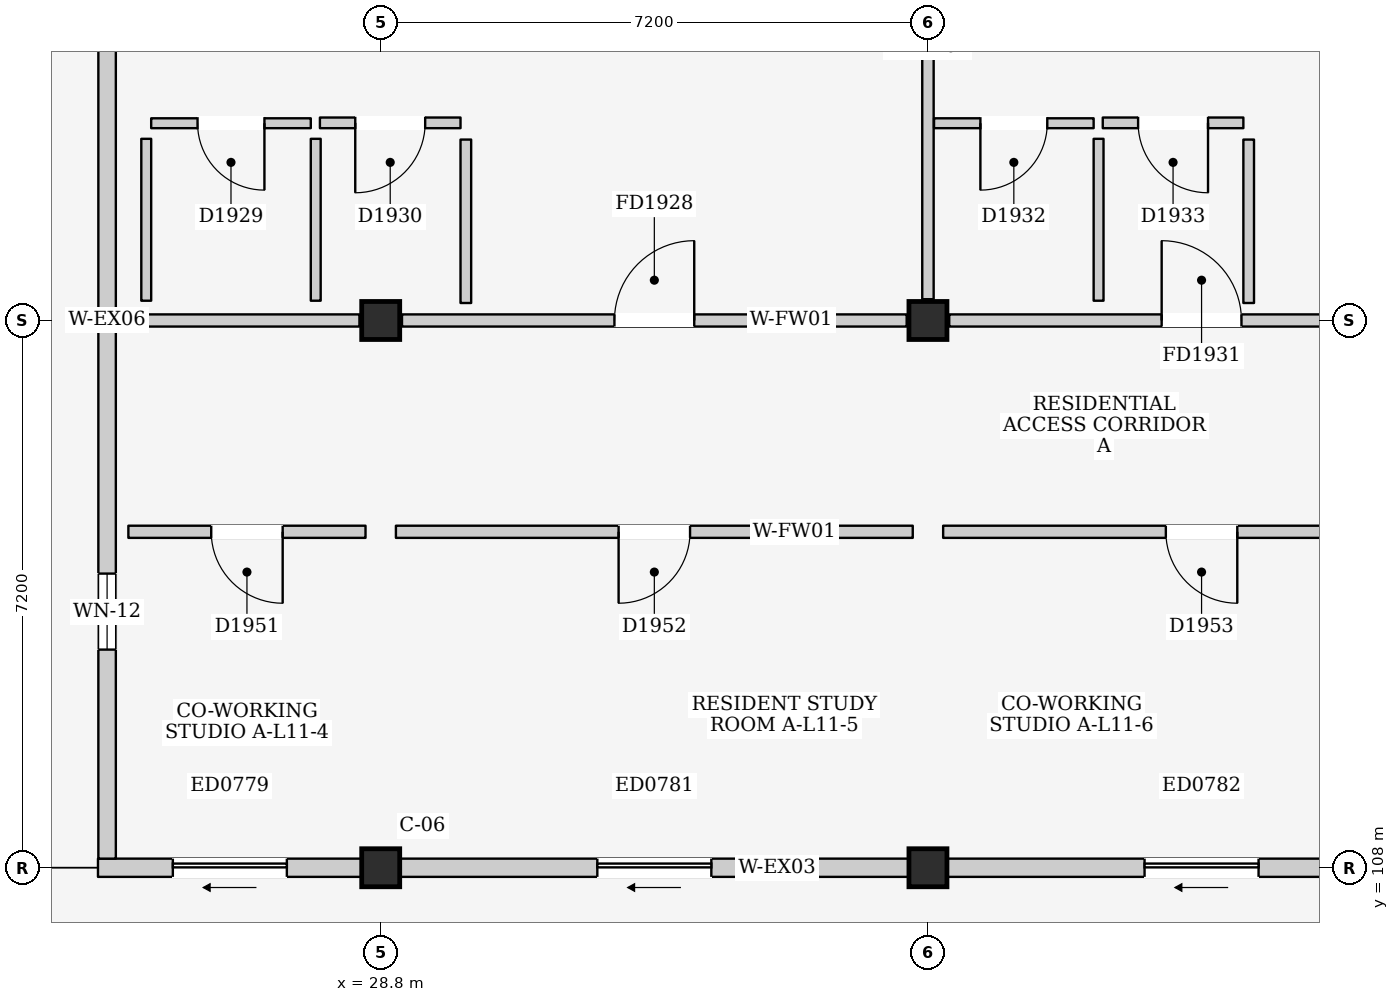
"""IFC4 building model, lengths in metres.
Left out: names, types, materials, properties, quantities, classifications, styles, units other than length and angle.
Written with IfcOpenShell. Run it as: python <this file> out.ifc"""

import sys

from ifc_helpers import new_model, si_unit, direction, frame, frame_2d, origin, origin_2d, place, context, subcontext, project, spatial, rectangle, extrude, element, fill, save


model = new_model("IFC4")
c1 = context("Model", 3, precision=1e-05, world=origin(), true_north=direction((0.0, 1.0)))
c2 = subcontext(c1, "Body", "Model", "MODEL_VIEW")
j1 = project(units=[si_unit("LENGTHUNIT", "METRE"), si_unit("PLANEANGLEUNIT", "RADIAN")], contexts=[c1])
p1 = place(None, origin())
s1 = spatial("IfcSite", under=j1, at=p1, CompositionType="ELEMENT")
p2 = place(p1, origin())
s2 = spatial("IfcBuilding", under=s1, at=p2, CompositionType="ELEMENT")
p3 = place(p2, frame((0.0, 0.0, 38.0)))
s3 = spatial("IfcBuildingStorey", under=s2, at=p3, CompositionType="ELEMENT", Elevation=38.0)
for number, where, z_axis, x_axis in (
    (1, (28.8, 108.0, 0.0), (0.0, 0.0, 1.0), (1.0, 0.0, 0.0)),
    (2, (28.8, 115.2, 0.0), (0.0, 0.0, 1.0), (1.0, 0.0, 0.0)),
    (3, (36.0, 108.0, 0.0), (0.0, 0.0, 1.0), (1.0, 0.0, 0.0)),
    (4, (36.0, 115.2, 0.0), (0.0, 0.0, 1.0), (1.0, 0.0, 0.0)),
):
    element("IfcColumn", number, at=place(p3, frame(where, z_axis=z_axis, x_axis=x_axis)), inside=s3, PredefinedType="COLUMN", context=c2, shape_type="SweptSolid", body=[
        extrude(rectangle(XDim=0.5, YDim=0.5, at=origin_2d()), origin(), (0.0, 0.0, 1.0), 3.2),
    ])
p4 = place(p3, frame((25.08, 108.0, 0.0), z_axis=(0.0, 0.0, 1.0), x_axis=(1.0, 0.0, 0.0)))
e5 = element("IfcWall", 5, at=p4, inside=s3, PredefinedType="ELEMENTEDWALL", context=c2, shape_type="SweptSolid", body=[
    extrude(rectangle(XDim=3.47, YDim=0.24, at=frame_2d((1.735, 0.0))), origin(), (0.0, 0.0, 1.0), 2.325),
])
p5 = place(p4, frame((0.985, 0.0, 0.0)))
e6 = element("IfcOpeningElement", 6, at=p5, cuts=e5, PredefinedType="OPENING", context=c2, shape_type="SweptSolid", body=[
    extrude(rectangle(XDim=1.5, YDim=2.12, at=frame_2d((0.75, 1.06))), frame((0.0, 0.135, 0.0), z_axis=(0.0, -1.0, 0.0), x_axis=(1.0, 0.0, 0.0)), (0.0, 0.0, 1.0), 0.27),
])
p6 = place(p3, frame((29.05, 108.0, 0.0), z_axis=(0.0, 0.0, 1.0), x_axis=(1.0, 0.0, 0.0)))
e7 = element("IfcWall", 7, at=p6, inside=s3, PredefinedType="ELEMENTEDWALL", context=c2, shape_type="SweptSolid", body=[
    extrude(rectangle(XDim=6.7, YDim=0.24, at=frame_2d((3.35, 0.0))), origin(), (0.0, 0.0, 1.0), 2.325),
])
p7 = place(p6, frame((2.6, 0.0, 0.0)))
e8 = element("IfcOpeningElement", 8, at=p7, cuts=e7, PredefinedType="OPENING", context=c2, shape_type="SweptSolid", body=[
    extrude(rectangle(XDim=1.5, YDim=2.12, at=frame_2d((0.75, 1.06))), frame((0.0, 0.135, 0.0), z_axis=(0.0, -1.0, 0.0), x_axis=(1.0, 0.0, 0.0)), (0.0, 0.0, 1.0), 0.27),
])
p8 = place(p3, frame((36.25, 108.0, 0.0), z_axis=(0.0, 0.0, 1.0), x_axis=(1.0, 0.0, 0.0)))
e9 = element("IfcWall", 9, at=p8, inside=s3, PredefinedType="ELEMENTEDWALL", context=c2, shape_type="SweptSolid", body=[
    extrude(rectangle(XDim=6.7, YDim=0.24, at=frame_2d((3.35, 0.0))), origin(), (0.0, 0.0, 1.0), 2.325),
])
p9 = place(p8, frame((2.6, 0.0, 0.0)))
e10 = element("IfcOpeningElement", 10, at=p9, cuts=e9, PredefinedType="OPENING", context=c2, shape_type="SweptSolid", body=[
    extrude(rectangle(XDim=1.5, YDim=2.12, at=frame_2d((0.75, 1.06))), frame((0.0, 0.135, 0.0), z_axis=(0.0, -1.0, 0.0), x_axis=(1.0, 0.0, 0.0)), (0.0, 0.0, 1.0), 0.27),
])
p10 = place(p3, frame((25.2, 108.12, 0.0), z_axis=(0.0, 0.0, 1.0), x_axis=(0.0, 1.0, 0.0)))
e11 = element("IfcWall", 11, at=p10, inside=s3, PredefinedType="ELEMENTEDWALL", context=c2, shape_type="SweptSolid", body=[
    extrude(rectangle(XDim=7.08, YDim=0.23, at=frame_2d((3.54, 0.0))), origin(), (0.0, 0.0, 1.0), 2.425),
])
p11 = place(p10, frame((2.75, 0.0, 1.1)))
e12 = element("IfcOpeningElement", 12, at=p11, cuts=e11, PredefinedType="OPENING", context=c2, shape_type="SweptSolid", body=[
    extrude(rectangle(XDim=1.0, YDim=0.9, at=frame_2d((0.5, 0.45))), frame((0.0, 0.13, 0.0), z_axis=(0.0, -1.0, 0.0), x_axis=(1.0, 0.0, 0.0)), (0.0, 0.0, 1.0), 0.26),
])
p12 = place(p3, frame((25.2, 115.2, 0.0), z_axis=(0.0, 0.0, 1.0), x_axis=(0.0, 1.0, 0.0)))
e13 = element("IfcWall", 13, at=p12, inside=s3, PredefinedType="ELEMENTEDWALL", context=c2, shape_type="SweptSolid", body=[
    extrude(rectangle(XDim=7.08, YDim=0.23, at=frame_2d((3.54, 0.0))), origin(), (0.0, 0.0, 1.0), 2.425),
])
p13 = place(p12, frame((3.6, 0.0, 0.0)))
e14 = element("IfcOpeningElement", 14, at=p13, cuts=e13, PredefinedType="OPENING", context=c2, shape_type="SweptSolid", body=[
    extrude(rectangle(XDim=1.08, YDim=2.12, at=frame_2d((0.54, 1.06))), frame((0.0, 0.13, 0.0), z_axis=(0.0, -1.0, 0.0), x_axis=(1.0, 0.0, 0.0)), (0.0, 0.0, 1.0), 0.26),
])
p14 = place(p3, frame((25.48, 115.2, 0.0), z_axis=(0.0, 0.0, 1.0), x_axis=(1.0, 0.0, 0.0)))
e15 = element("IfcWall", 15, at=p14, inside=s3, PredefinedType="PARTITIONING", context=c2, shape_type="SweptSolid", body=[
    extrude(rectangle(XDim=3.04, YDim=0.16, at=frame_2d((1.52, 0.0))), origin(), (0.0, 0.0, 1.0), 2.325),
])
p15 = place(p3, frame((29.08, 115.2, 0.0), z_axis=(0.0, 0.0, 1.0), x_axis=(1.0, 0.0, 0.0)))
e16 = element("IfcWall", 16, at=p15, inside=s3, PredefinedType="PARTITIONING", context=c2, shape_type="SweptSolid", body=[
    extrude(rectangle(XDim=6.64, YDim=0.16, at=frame_2d((3.32, 0.0))), origin(), (0.0, 0.0, 1.0), 2.325),
])
p16 = place(p15, frame((2.795, 0.0, 0.0)))
e17 = element("IfcOpeningElement", 17, at=p16, cuts=e16, PredefinedType="OPENING", context=c2, shape_type="SweptSolid", body=[
    extrude(rectangle(XDim=1.05, YDim=2.15, at=frame_2d((0.525, 1.075))), frame((0.0, 0.095, 0.0), z_axis=(0.0, -1.0, 0.0), x_axis=(1.0, 0.0, 0.0)), (0.0, 0.0, 1.0), 0.19),
])
p17 = place(p3, frame((36.0, 115.48, 0.0), z_axis=(0.0, 0.0, 1.0), x_axis=(0.0, 1.0, 0.0)))
e18 = element("IfcWall", 18, at=p17, inside=s3, PredefinedType="PARTITIONING", context=c2, shape_type="SweptSolid", body=[
    extrude(rectangle(XDim=6.64, YDim=0.15, at=frame_2d((3.32, 0.0))), origin(), (0.0, 0.0, 1.0), 2.475),
])
p18 = place(p3, frame((25.78, 117.795, 0.0), z_axis=(0.0, 0.0, 1.0), x_axis=(1.0, 0.0, 0.0)))
e19 = element("IfcWall", 19, at=p18, inside=s3, PredefinedType="PARTITIONING", context=c2, shape_type="SweptSolid", body=[
    extrude(rectangle(XDim=2.1, YDim=0.13, at=frame_2d((1.05, 0.0))), origin(), (0.0, 0.0, 1.0), 2.99),
])
p19 = place(p18, frame((0.61, 0.0, 0.0)))
e20 = element("IfcOpeningElement", 20, at=p19, cuts=e19, PredefinedType="OPENING", context=c2, shape_type="SweptSolid", body=[
    extrude(rectangle(XDim=0.88, YDim=2.1, at=frame_2d((0.44, 1.05))), frame((0.0, 0.08, 0.0), z_axis=(0.0, -1.0, 0.0), x_axis=(1.0, 0.0, 0.0)), (0.0, 0.0, 1.0), 0.16),
])
for number, where, z_axis, x_axis in (
    (21, (27.945, 115.46, 0.0), (0.0, 0.0, 1.0), (0.0, 1.0, 0.0)),
    (22, (25.715, 115.46, 0.0), (0.0, 0.0, 1.0), (0.0, 1.0, 0.0)),
):
    element("IfcWall", number, at=place(p3, frame(where, z_axis=z_axis, x_axis=x_axis)), inside=s3, PredefinedType="PARTITIONING", context=c2, shape_type="SweptSolid", body=[
        extrude(rectangle(XDim=2.13, YDim=0.13, at=frame_2d((1.065, 0.0))), origin(), (0.0, 0.0, 1.0), 2.99),
    ])
p20 = place(p3, frame((28.0, 117.8, 0.0), z_axis=(0.0, 0.0, 1.0), x_axis=(1.0, 0.0, 0.0)))
e23 = element("IfcWall", 23, at=p20, inside=s3, PredefinedType="PARTITIONING", context=c2, shape_type="SweptSolid", body=[
    extrude(rectangle(XDim=1.85, YDim=0.14, at=frame_2d((0.925, 0.0))), origin(), (0.0, 0.0, 1.0), 2.99),
])
p21 = place(p20, frame((0.465, 0.0, 0.0)))
e24 = element("IfcOpeningElement", 24, at=p21, cuts=e23, PredefinedType="OPENING", context=c2, shape_type="SweptSolid", body=[
    extrude(rectangle(XDim=0.92, YDim=2.1, at=frame_2d((0.46, 1.05))), frame((0.0, 0.085, 0.0), z_axis=(0.0, -1.0, 0.0), x_axis=(1.0, 0.0, 0.0)), (0.0, 0.0, 1.0), 0.17),
])
p22 = place(p3, frame((29.92, 115.43, 0.0), z_axis=(0.0, 0.0, 1.0), x_axis=(0.0, 1.0, 0.0)))
e25 = element("IfcWall", 25, at=p22, inside=s3, PredefinedType="PARTITIONING", context=c2, shape_type="SweptSolid", body=[
    extrude(rectangle(XDim=2.15, YDim=0.14, at=frame_2d((1.075, 0.0))), origin(), (0.0, 0.0, 1.0), 2.99),
])
p23 = place(p3, frame((36.28, 115.2, 0.0), z_axis=(0.0, 0.0, 1.0), x_axis=(1.0, 0.0, 0.0)))
e26 = element("IfcWall", 26, at=p23, inside=s3, PredefinedType="PARTITIONING", context=c2, shape_type="SweptSolid", body=[
    extrude(rectangle(XDim=6.64, YDim=0.16, at=frame_2d((3.32, 0.0))), origin(), (0.0, 0.0, 1.0), 2.325),
])
p24 = place(p23, frame((2.795, 0.0, 0.0)))
e27 = element("IfcOpeningElement", 27, at=p24, cuts=e26, PredefinedType="OPENING", context=c2, shape_type="SweptSolid", body=[
    extrude(rectangle(XDim=1.05, YDim=2.15, at=frame_2d((0.525, 1.075))), frame((0.0, 0.095, 0.0), z_axis=(0.0, -1.0, 0.0), x_axis=(1.0, 0.0, 0.0)), (0.0, 0.0, 1.0), 0.19),
])
p25 = place(p3, frame((36.08, 117.795, 0.0), z_axis=(0.0, 0.0, 1.0), x_axis=(1.0, 0.0, 0.0)))
e28 = element("IfcWall", 28, at=p25, inside=s3, PredefinedType="PARTITIONING", context=c2, shape_type="SweptSolid", body=[
    extrude(rectangle(XDim=2.1, YDim=0.13, at=frame_2d((1.05, 0.0))), origin(), (0.0, 0.0, 1.0), 2.99),
])
p26 = place(p25, frame((0.61, 0.0, 0.0)))
e29 = element("IfcOpeningElement", 29, at=p26, cuts=e28, PredefinedType="OPENING", context=c2, shape_type="SweptSolid", body=[
    extrude(rectangle(XDim=0.88, YDim=2.1, at=frame_2d((0.44, 1.05))), frame((0.0, 0.08, 0.0), z_axis=(0.0, -1.0, 0.0), x_axis=(1.0, 0.0, 0.0)), (0.0, 0.0, 1.0), 0.16),
])
p27 = place(p3, frame((38.245, 115.46, 0.0), z_axis=(0.0, 0.0, 1.0), x_axis=(0.0, 1.0, 0.0)))
e30 = element("IfcWall", 30, at=p27, inside=s3, PredefinedType="PARTITIONING", context=c2, shape_type="SweptSolid", body=[
    extrude(rectangle(XDim=2.13, YDim=0.13, at=frame_2d((1.065, 0.0))), origin(), (0.0, 0.0, 1.0), 2.99),
])
p28 = place(p3, frame((38.3, 117.8, 0.0), z_axis=(0.0, 0.0, 1.0), x_axis=(1.0, 0.0, 0.0)))
e31 = element("IfcWall", 31, at=p28, inside=s3, PredefinedType="PARTITIONING", context=c2, shape_type="SweptSolid", body=[
    extrude(rectangle(XDim=1.85, YDim=0.14, at=frame_2d((0.925, 0.0))), origin(), (0.0, 0.0, 1.0), 2.99),
])
p29 = place(p28, frame((0.465, 0.0, 0.0)))
e32 = element("IfcOpeningElement", 32, at=p29, cuts=e31, PredefinedType="OPENING", context=c2, shape_type="SweptSolid", body=[
    extrude(rectangle(XDim=0.92, YDim=2.1, at=frame_2d((0.46, 1.05))), frame((0.0, 0.085, 0.0), z_axis=(0.0, -1.0, 0.0), x_axis=(1.0, 0.0, 0.0)), (0.0, 0.0, 1.0), 0.17),
])
p30 = place(p3, frame((40.22, 115.43, 0.0), z_axis=(0.0, 0.0, 1.0), x_axis=(0.0, 1.0, 0.0)))
e33 = element("IfcWall", 33, at=p30, inside=s3, PredefinedType="PARTITIONING", context=c2, shape_type="SweptSolid", body=[
    extrude(rectangle(XDim=2.15, YDim=0.14, at=frame_2d((1.075, 0.0))), origin(), (0.0, 0.0, 1.0), 2.99),
])
p31 = place(p3, frame((25.48, 112.42, 0.0), z_axis=(0.0, 0.0, 1.0), x_axis=(1.0, 0.0, 0.0)))
e34 = element("IfcWall", 34, at=p31, inside=s3, PredefinedType="PARTITIONING", context=c2, shape_type="SweptSolid", body=[
    extrude(rectangle(XDim=3.12, YDim=0.16, at=frame_2d((1.56, 0.0))), origin(), (0.0, 0.0, 1.0), 2.99),
])
p32 = place(p31, frame((1.09, 0.0, 0.0)))
e35 = element("IfcOpeningElement", 35, at=p32, cuts=e34, PredefinedType="OPENING", context=c2, shape_type="SweptSolid", body=[
    extrude(rectangle(XDim=0.94, YDim=2.12, at=frame_2d((0.47, 1.06))), frame((0.0, 0.095, 0.0), z_axis=(0.0, -1.0, 0.0), x_axis=(1.0, 0.0, 0.0)), (0.0, 0.0, 1.0), 0.19),
])
p33 = place(p3, frame((29.0, 112.42, 0.0), z_axis=(0.0, 0.0, 1.0), x_axis=(1.0, 0.0, 0.0)))
e36 = element("IfcWall", 36, at=p33, inside=s3, PredefinedType="PARTITIONING", context=c2, shape_type="SweptSolid", body=[
    extrude(rectangle(XDim=6.8, YDim=0.16, at=frame_2d((3.4, 0.0))), origin(), (0.0, 0.0, 1.0), 2.99),
])
p34 = place(p33, frame((2.93, 0.0, 0.0)))
e37 = element("IfcOpeningElement", 37, at=p34, cuts=e36, PredefinedType="OPENING", context=c2, shape_type="SweptSolid", body=[
    extrude(rectangle(XDim=0.94, YDim=2.12, at=frame_2d((0.47, 1.06))), frame((0.0, 0.095, 0.0), z_axis=(0.0, -1.0, 0.0), x_axis=(1.0, 0.0, 0.0)), (0.0, 0.0, 1.0), 0.19),
])
p35 = place(p3, frame((36.2, 112.42, 0.0), z_axis=(0.0, 0.0, 1.0), x_axis=(1.0, 0.0, 0.0)))
e38 = element("IfcWall", 38, at=p35, inside=s3, PredefinedType="PARTITIONING", context=c2, shape_type="SweptSolid", body=[
    extrude(rectangle(XDim=6.8, YDim=0.16, at=frame_2d((3.4, 0.0))), origin(), (0.0, 0.0, 1.0), 2.99),
])
p36 = place(p35, frame((2.93, 0.0, 0.0)))
e39 = element("IfcOpeningElement", 39, at=p36, cuts=e38, PredefinedType="OPENING", context=c2, shape_type="SweptSolid", body=[
    extrude(rectangle(XDim=0.94, YDim=2.12, at=frame_2d((0.47, 1.06))), frame((0.0, 0.095, 0.0), z_axis=(0.0, -1.0, 0.0), x_axis=(1.0, 0.0, 0.0)), (0.0, 0.0, 1.0), 0.19),
])
p37 = place(p5, frame((1.5, 0.0, 0.0), z_axis=(0.0, 0.0, 1.0), x_axis=(-1.0, 0.0, 0.0)))
e40 = element("IfcDoor", 40, at=p37, inside=s3, OperationType="SLIDING_TO_LEFT", PredefinedType="DOOR", context=c2, shape_type="SweptSolid", body=[
    extrude(rectangle(XDim=1.5, YDim=2.12, at=frame_2d((0.75, 1.06))), frame((0.0, 0.025, 0.0), z_axis=(0.0, -1.0, 0.0), x_axis=(1.0, 0.0, 0.0)), (0.0, 0.0, 1.0), 0.05),
])
fill(e6, e40)
p38 = place(p7, frame((1.5, 0.0, 0.0), z_axis=(0.0, 0.0, 1.0), x_axis=(-1.0, 0.0, 0.0)))
e41 = element("IfcDoor", 41, at=p38, inside=s3, OperationType="SLIDING_TO_LEFT", PredefinedType="DOOR", context=c2, shape_type="SweptSolid", body=[
    extrude(rectangle(XDim=1.5, YDim=2.12, at=frame_2d((0.75, 1.06))), frame((0.0, 0.025, 0.0), z_axis=(0.0, -1.0, 0.0), x_axis=(1.0, 0.0, 0.0)), (0.0, 0.0, 1.0), 0.05),
])
fill(e8, e41)
p39 = place(p9, frame((1.5, 0.0, 0.0), z_axis=(0.0, 0.0, 1.0), x_axis=(-1.0, 0.0, 0.0)))
e42 = element("IfcDoor", 42, at=p39, inside=s3, OperationType="SLIDING_TO_LEFT", PredefinedType="DOOR", context=c2, shape_type="SweptSolid", body=[
    extrude(rectangle(XDim=1.5, YDim=2.12, at=frame_2d((0.75, 1.06))), frame((0.0, 0.025, 0.0), z_axis=(0.0, -1.0, 0.0), x_axis=(1.0, 0.0, 0.0)), (0.0, 0.0, 1.0), 0.05),
])
fill(e10, e42)
p40 = place(p11, origin())
e43 = element("IfcWindow", 43, at=p40, inside=s3, PartitioningType="SINGLE_PANEL", PredefinedType="WINDOW", context=c2, shape_type="SweptSolid", body=[
    extrude(rectangle(XDim=1.0, YDim=0.9, at=frame_2d((0.5, 0.45))), frame((0.0, 0.03, 0.0), z_axis=(0.0, -1.0, 0.0), x_axis=(1.0, 0.0, 0.0)), (0.0, 0.0, 1.0), 0.06),
])
fill(e12, e43)
p41 = place(p16, origin())
e44 = element("IfcDoor", 44, at=p41, inside=s3, OperationType="SINGLE_SWING_RIGHT", PredefinedType="DOOR", context=c2, shape_type="SweptSolid", body=[
    extrude(rectangle(XDim=1.05, YDim=2.15, at=frame_2d((0.525, 1.075))), frame((0.0, 0.025, 0.0), z_axis=(0.0, -1.0, 0.0), x_axis=(1.0, 0.0, 0.0)), (0.0, 0.0, 1.0), 0.05),
])
fill(e17, e44)
p42 = place(p19, frame((0.88, 0.0, 0.0), z_axis=(0.0, 0.0, 1.0), x_axis=(-1.0, 0.0, 0.0)))
e45 = element("IfcDoor", 45, at=p42, inside=s3, OperationType="SINGLE_SWING_LEFT", PredefinedType="DOOR", context=c2, shape_type="SweptSolid", body=[
    extrude(rectangle(XDim=0.88, YDim=2.1, at=frame_2d((0.44, 1.05))), frame((0.0, 0.025, 0.0), z_axis=(0.0, -1.0, 0.0), x_axis=(1.0, 0.0, 0.0)), (0.0, 0.0, 1.0), 0.05),
])
fill(e20, e45)
p43 = place(p21, frame((0.92, 0.0, 0.0), z_axis=(0.0, 0.0, 1.0), x_axis=(-1.0, 0.0, 0.0)))
e46 = element("IfcDoor", 46, at=p43, inside=s3, OperationType="SINGLE_SWING_RIGHT", PredefinedType="DOOR", context=c2, shape_type="SweptSolid", body=[
    extrude(rectangle(XDim=0.92, YDim=2.1, at=frame_2d((0.46, 1.05))), frame((0.0, 0.025, 0.0), z_axis=(0.0, -1.0, 0.0), x_axis=(1.0, 0.0, 0.0)), (0.0, 0.0, 1.0), 0.05),
])
fill(e24, e46)
p44 = place(p24, origin())
e47 = element("IfcDoor", 47, at=p44, inside=s3, OperationType="SINGLE_SWING_LEFT", PredefinedType="DOOR", context=c2, shape_type="SweptSolid", body=[
    extrude(rectangle(XDim=1.05, YDim=2.15, at=frame_2d((0.525, 1.075))), frame((0.0, 0.025, 0.0), z_axis=(0.0, -1.0, 0.0), x_axis=(1.0, 0.0, 0.0)), (0.0, 0.0, 1.0), 0.05),
])
fill(e27, e47)
p45 = place(p26, frame((0.88, 0.0, 0.0), z_axis=(0.0, 0.0, 1.0), x_axis=(-1.0, 0.0, 0.0)))
e48 = element("IfcDoor", 48, at=p45, inside=s3, OperationType="SINGLE_SWING_RIGHT", PredefinedType="DOOR", context=c2, shape_type="SweptSolid", body=[
    extrude(rectangle(XDim=0.88, YDim=2.1, at=frame_2d((0.44, 1.05))), frame((0.0, 0.025, 0.0), z_axis=(0.0, -1.0, 0.0), x_axis=(1.0, 0.0, 0.0)), (0.0, 0.0, 1.0), 0.05),
])
fill(e29, e48)
p46 = place(p29, frame((0.92, 0.0, 0.0), z_axis=(0.0, 0.0, 1.0), x_axis=(-1.0, 0.0, 0.0)))
e49 = element("IfcDoor", 49, at=p46, inside=s3, OperationType="SINGLE_SWING_LEFT", PredefinedType="DOOR", context=c2, shape_type="SweptSolid", body=[
    extrude(rectangle(XDim=0.92, YDim=2.1, at=frame_2d((0.46, 1.05))), frame((0.0, 0.025, 0.0), z_axis=(0.0, -1.0, 0.0), x_axis=(1.0, 0.0, 0.0)), (0.0, 0.0, 1.0), 0.05),
])
fill(e32, e49)
p47 = place(p32, frame((0.94, 0.0, 0.0), z_axis=(0.0, 0.0, 1.0), x_axis=(-1.0, 0.0, 0.0)))
e50 = element("IfcDoor", 50, at=p47, inside=s3, OperationType="SINGLE_SWING_LEFT", PredefinedType="DOOR", context=c2, shape_type="SweptSolid", body=[
    extrude(rectangle(XDim=0.94, YDim=2.12, at=frame_2d((0.47, 1.06))), frame((0.0, 0.025, 0.0), z_axis=(0.0, -1.0, 0.0), x_axis=(1.0, 0.0, 0.0)), (0.0, 0.0, 1.0), 0.05),
])
fill(e35, e50)
p48 = place(p34, frame((0.94, 0.0, 0.0), z_axis=(0.0, 0.0, 1.0), x_axis=(-1.0, 0.0, 0.0)))
e51 = element("IfcDoor", 51, at=p48, inside=s3, OperationType="SINGLE_SWING_RIGHT", PredefinedType="DOOR", context=c2, shape_type="SweptSolid", body=[
    extrude(rectangle(XDim=0.94, YDim=2.12, at=frame_2d((0.47, 1.06))), frame((0.0, 0.025, 0.0), z_axis=(0.0, -1.0, 0.0), x_axis=(1.0, 0.0, 0.0)), (0.0, 0.0, 1.0), 0.05),
])
fill(e37, e51)
p49 = place(p36, frame((0.94, 0.0, 0.0), z_axis=(0.0, 0.0, 1.0), x_axis=(-1.0, 0.0, 0.0)))
e52 = element("IfcDoor", 52, at=p49, inside=s3, OperationType="SINGLE_SWING_LEFT", PredefinedType="DOOR", context=c2, shape_type="SweptSolid", body=[
    extrude(rectangle(XDim=0.94, YDim=2.12, at=frame_2d((0.47, 1.06))), frame((0.0, 0.025, 0.0), z_axis=(0.0, -1.0, 0.0), x_axis=(1.0, 0.0, 0.0)), (0.0, 0.0, 1.0), 0.05),
])
fill(e39, e52)
save(model, sys.argv[1])
